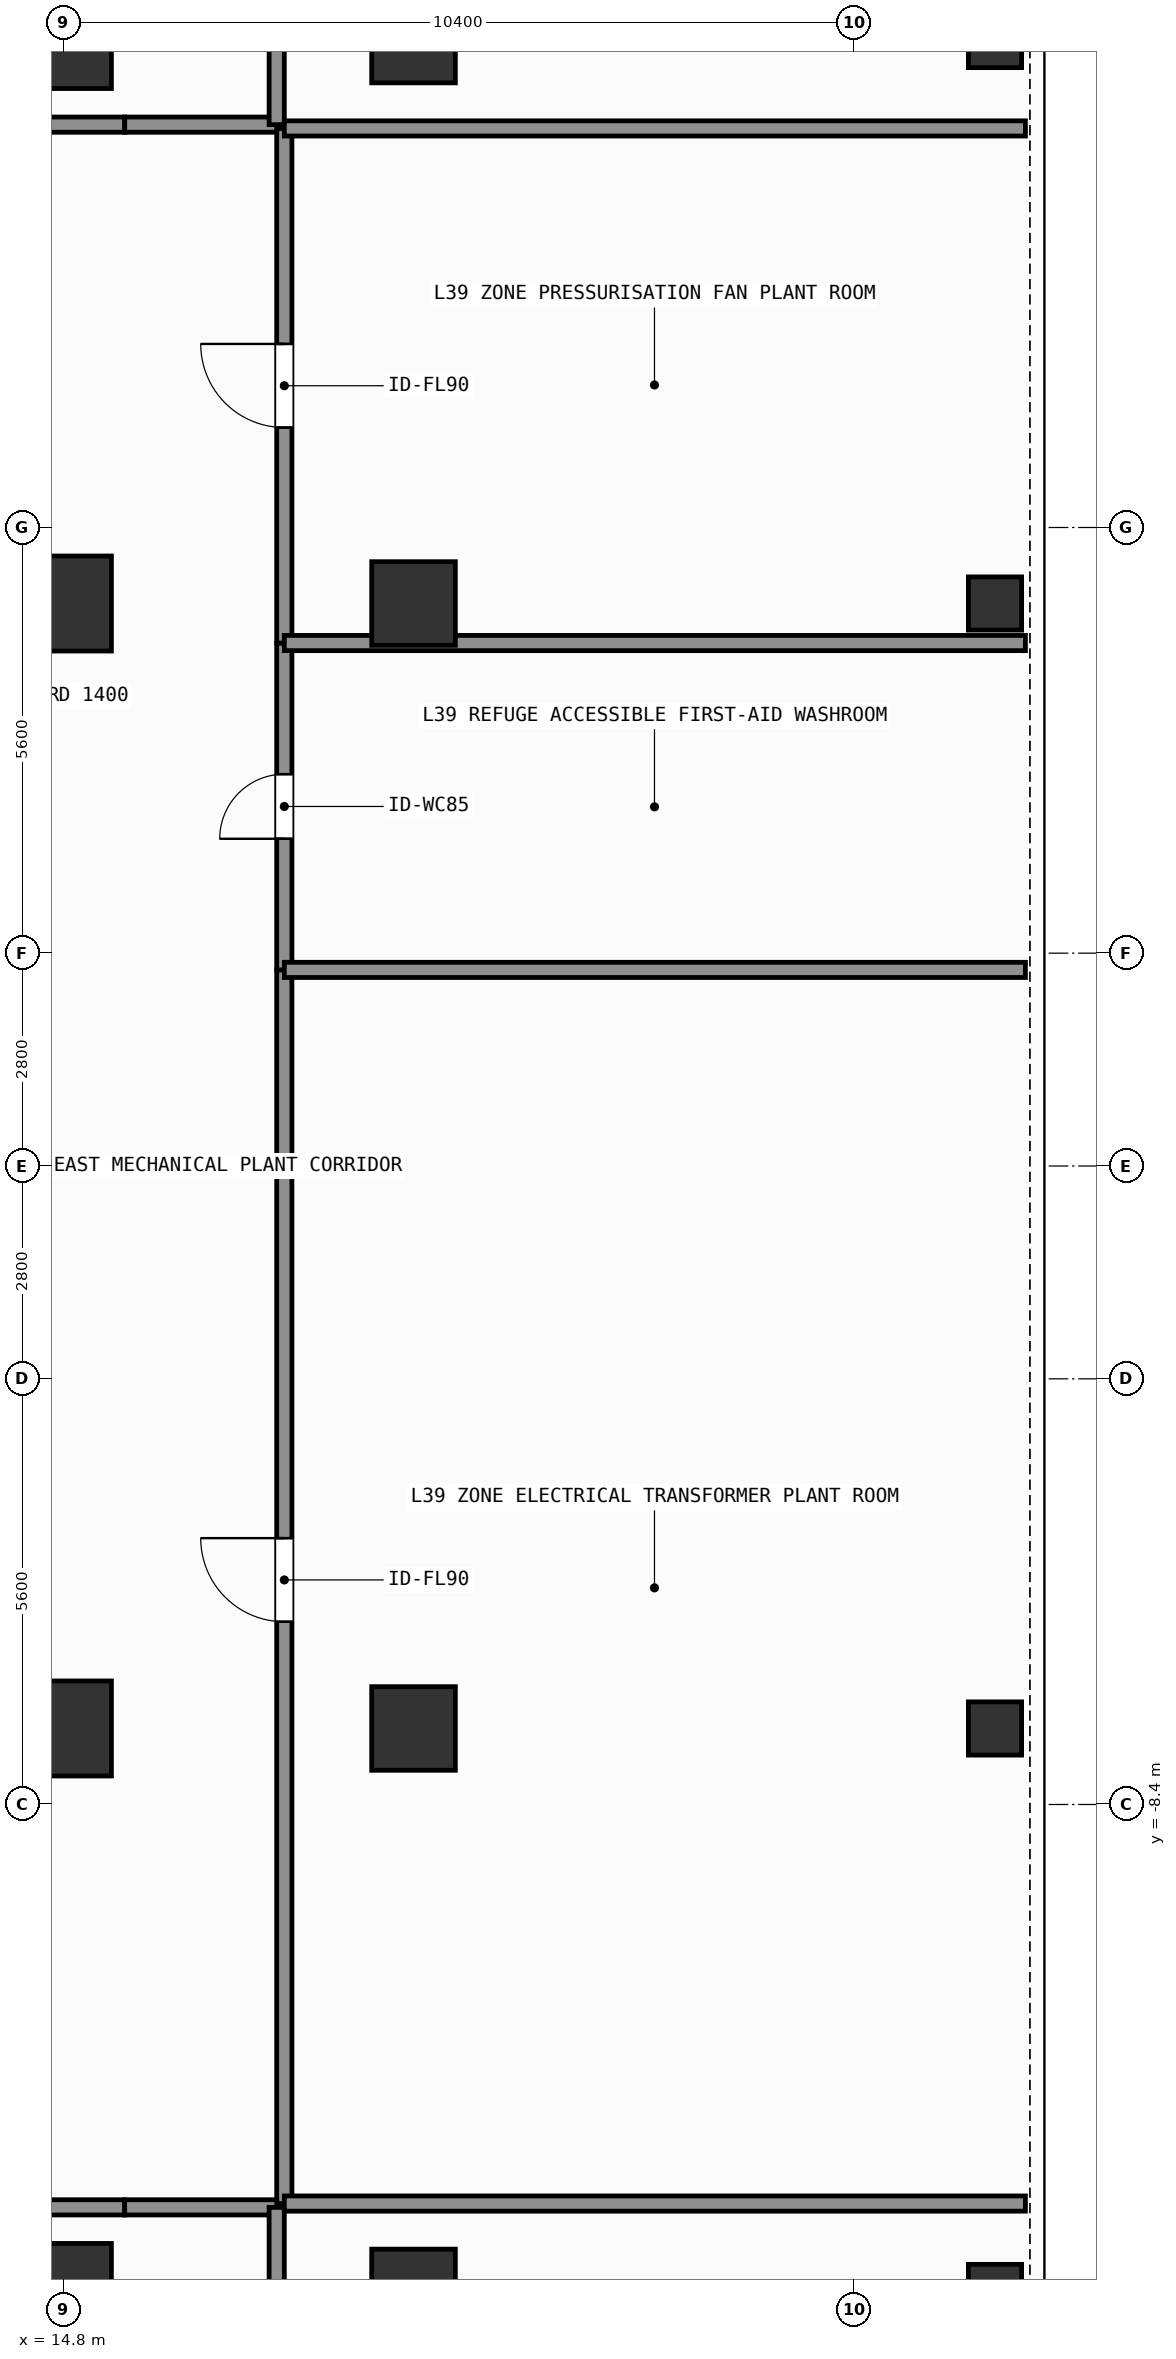
"""IFC4 building model, lengths in metres.
Left out: names, types, materials, properties, quantities, classifications, styles, units other than length and angle.
Written with IfcOpenShell. Run it as: python <this file> out.ifc"""

import sys

from ifc_helpers import new_model, si_unit, direction, frame, frame_2d, origin, origin_2d, place, context, subcontext, project, spatial, rectangle, hollow_rectangle, extrude, element, fill, save


model = new_model("IFC4")
c1 = context("Model", 3, precision=1e-05, world=origin(), true_north=direction((0.0, 1.0)))
c2 = subcontext(c1, "Body", "Model", "MODEL_VIEW")
j1 = project(units=[si_unit("LENGTHUNIT", "METRE"), si_unit("PLANEANGLEUNIT", "RADIAN")], contexts=[c1])
p1 = place(None, origin())
s1 = spatial("IfcSite", under=j1, at=p1, CompositionType="ELEMENT")
p2 = place(p1, origin())
s2 = spatial("IfcBuilding", under=s1, at=p2, CompositionType="ELEMENT")
p3 = place(p2, frame((0.0, 0.0, 156.3)))
s3 = spatial("IfcBuildingStorey", under=s2, at=p3, CompositionType="ELEMENT", Elevation=156.3)
for number, where, z_axis, x_axis in (
    (1, (14.8, -14.8, 0.0), (0.0, 0.0, 1.0), (1.0, 0.0, 0.0)),
    (2, (14.8, 14.8, 0.0), (0.0, 0.0, 1.0), (1.0, 0.0, 0.0)),
    (3, (14.8, -7.4, 0.0), (0.0, 0.0, 1.0), (1.0, 0.0, 0.0)),
    (4, (14.8, 7.4, 0.0), (0.0, 0.0, 1.0), (1.0, 0.0, 0.0)),
):
    element("IfcColumn", number, at=place(p3, frame(where, z_axis=z_axis, x_axis=x_axis)), inside=s3, PredefinedType="COLUMN", context=c2, shape_type="SweptSolid", body=[
        extrude(rectangle(XDim=1.25, YDim=1.25, at=origin_2d()), origin(), (0.0, 0.0, 1.0), 7.8),
    ])
for number, where, z_axis, x_axis in (
    (5, (19.4, -14.8, 0.0), (0.0, 0.0, 1.0), (1.0, 0.0, 0.0)),
    (6, (19.4, -7.4, 0.0), (0.0, 0.0, 1.0), (1.0, 0.0, 0.0)),
    (7, (19.4, 7.4, 0.0), (0.0, 0.0, 1.0), (1.0, 0.0, 0.0)),
    (8, (19.4, 14.8, 0.0), (0.0, 0.0, 1.0), (1.0, 0.0, 0.0)),
):
    element("IfcColumn", number, at=place(p3, frame(where, z_axis=z_axis, x_axis=x_axis)), inside=s3, PredefinedType="COLUMN", context=c2, shape_type="SweptSolid", body=[
        extrude(rectangle(XDim=1.1, YDim=1.1, at=origin_2d()), origin(), (0.0, 0.0, 1.0), 7.8),
    ])
for number, where, z_axis, x_axis in (
    (9, (27.05, -14.8, 0.0), (0.0, 0.0, 1.0), (1.0, 0.0, 0.0)),
    (10, (27.05, -7.4, 0.0), (0.0, 0.0, 1.0), (1.0, 0.0, 0.0)),
    (11, (27.05, 7.4, 0.0), (0.0, 0.0, 1.0), (1.0, 0.0, 0.0)),
    (12, (27.05, 14.8, 0.0), (0.0, 0.0, 1.0), (1.0, 0.0, 0.0)),
):
    element("IfcColumn", number, at=place(p3, frame(where, z_axis=z_axis, x_axis=x_axis)), inside=s3, PredefinedType="COLUMN", context=c2, shape_type="SweptSolid", body=[
        extrude(hollow_rectangle(XDim=0.7, YDim=0.7, WallThickness=0.032, at=origin_2d()), origin(), (0.0, 0.0, 1.0), 7.8),
    ])
p4 = place(p3, frame((-11.55, -13.7, 0.0), z_axis=(0.0, 0.0, 1.0), x_axis=(1.0, 0.0, 0.0)))
e13 = element("IfcWall", 13, at=p4, inside=s3, PredefinedType="SOLIDWALL", context=c2, shape_type="SweptSolid", body=[
    extrude(rectangle(XDim=27.15, YDim=0.2, at=frame_2d((13.575, 0.0))), origin(), (0.0, 0.0, 1.0), 7.58),
])
p5 = place(p4, frame((9.114, 0.0, 0.0)))
e14 = element("IfcOpeningElement", 14, at=p5, cuts=e13, PredefinedType="OPENING", context=c2, shape_type="SweptSolid", body=[
    extrude(rectangle(XDim=1.4, YDim=2.2, at=frame_2d((0.7, 1.1))), frame((0.0, 0.11, 0.0), z_axis=(0.0, -1.0, 0.0), x_axis=(1.0, 0.0, 0.0)), (0.0, 0.0, 1.0), 0.22),
])
p6 = place(p3, frame((-11.55, 13.7, 0.0), z_axis=(0.0, 0.0, 1.0), x_axis=(1.0, 0.0, 0.0)))
e15 = element("IfcWall", 15, at=p6, inside=s3, PredefinedType="SOLIDWALL", context=c2, shape_type="SweptSolid", body=[
    extrude(rectangle(XDim=27.15, YDim=0.2, at=frame_2d((13.575, 0.0))), origin(), (0.0, 0.0, 1.0), 7.58),
])
p7 = place(p6, frame((9.114, 0.0, 0.0)))
e16 = element("IfcOpeningElement", 16, at=p7, cuts=e15, PredefinedType="OPENING", context=c2, shape_type="SweptSolid", body=[
    extrude(rectangle(XDim=1.4, YDim=2.2, at=frame_2d((0.7, 1.1))), frame((0.0, 0.11, 0.0), z_axis=(0.0, -1.0, 0.0), x_axis=(1.0, 0.0, 0.0)), (0.0, 0.0, 1.0), 0.22),
])
p8 = place(p3, frame((17.7, -13.65, 0.0), z_axis=(0.0, 0.0, 1.0), x_axis=(0.0, 1.0, 0.0)))
e17 = element("IfcWall", 17, at=p8, inside=s3, PredefinedType="SOLIDWALL", context=c2, shape_type="SweptSolid", body=[
    extrude(rectangle(XDim=16.23, YDim=0.2, at=frame_2d((8.115, 0.0))), origin(), (0.0, 0.0, 1.0), 7.58),
])
p9 = place(p8, frame((7.654, 0.0, 0.0)))
e18 = element("IfcOpeningElement", 18, at=p9, cuts=e17, PredefinedType="OPENING", context=c2, shape_type="SweptSolid", body=[
    extrude(rectangle(XDim=1.1, YDim=2.15, at=frame_2d((0.55, 1.075))), frame((0.0, 0.11, 0.0), z_axis=(0.0, -1.0, 0.0), x_axis=(1.0, 0.0, 0.0)), (0.0, 0.0, 1.0), 0.22),
])
p10 = place(p3, frame((17.7, 2.58, 0.0), z_axis=(0.0, 0.0, 1.0), x_axis=(0.0, 1.0, 0.0)))
e19 = element("IfcWall", 19, at=p10, inside=s3, PredefinedType="SOLIDWALL", context=c2, shape_type="SweptSolid", body=[
    extrude(rectangle(XDim=4.3, YDim=0.2, at=frame_2d((2.15, 0.0))), origin(), (0.0, 0.0, 1.0), 7.58),
])
p11 = place(p10, frame((1.725, 0.0, 0.0)))
e20 = element("IfcOpeningElement", 20, at=p11, cuts=e19, PredefinedType="OPENING", context=c2, shape_type="SweptSolid", body=[
    extrude(rectangle(XDim=0.85, YDim=2.1, at=frame_2d((0.425, 1.05))), frame((0.0, 0.11, 0.0), z_axis=(0.0, -1.0, 0.0), x_axis=(1.0, 0.0, 0.0)), (0.0, 0.0, 1.0), 0.22),
])
p12 = place(p3, frame((17.7, 6.88, 0.0), z_axis=(0.0, 0.0, 1.0), x_axis=(0.0, 1.0, 0.0)))
e21 = element("IfcWall", 21, at=p12, inside=s3, PredefinedType="SOLIDWALL", context=c2, shape_type="SweptSolid", body=[
    extrude(rectangle(XDim=6.77, YDim=0.2, at=frame_2d((3.385, 0.0))), origin(), (0.0, 0.0, 1.0), 7.58),
])
p13 = place(p12, frame((2.835, 0.0, 0.0)))
e22 = element("IfcOpeningElement", 22, at=p13, cuts=e21, PredefinedType="OPENING", context=c2, shape_type="SweptSolid", body=[
    extrude(rectangle(XDim=1.1, YDim=2.15, at=frame_2d((0.55, 1.075))), frame((0.0, 0.11, 0.0), z_axis=(0.0, -1.0, 0.0), x_axis=(1.0, 0.0, 0.0)), (0.0, 0.0, 1.0), 0.22),
])
for number, where, z_axis, x_axis in (
    (23, (15.6, -13.7, 0.0), (0.0, 0.0, 1.0), (1.0, 0.0, 0.0)),
    (24, (15.6, 13.7, 0.0), (0.0, 0.0, 1.0), (1.0, 0.0, 0.0)),
):
    element("IfcWall", number, at=place(p3, frame(where, z_axis=z_axis, x_axis=x_axis)), inside=s3, PredefinedType="SOLIDWALL", context=c2, shape_type="SweptSolid", body=[
        extrude(rectangle(XDim=2.0, YDim=0.2, at=frame_2d((1.0, 0.0))), origin(), (0.0, 0.0, 1.0), 7.58),
    ])
for number, where, z_axis, x_axis in (
    (25, (17.6, -23.55, 0.0), (0.0, 0.0, 1.0), (0.0, 1.0, 0.0)),
    (26, (17.6, 13.7, 0.0), (0.0, 0.0, 1.0), (0.0, 1.0, 0.0)),
):
    element("IfcWall", number, at=place(p3, frame(where, z_axis=z_axis, x_axis=x_axis)), inside=s3, PredefinedType="SOLIDWALL", context=c2, shape_type="SweptSolid", body=[
        extrude(rectangle(XDim=9.85, YDim=0.2, at=frame_2d((4.925, 0.0))), origin(), (0.0, 0.0, 1.0), 7.58),
    ])
for number, where, z_axis, x_axis in (
    (27, (17.7, -13.65, 0.0), (0.0, 0.0, 1.0), (1.0, 0.0, 0.0)),
    (28, (17.7, 13.65, 0.0), (0.0, 0.0, 1.0), (1.0, 0.0, 0.0)),
    (29, (17.7, 2.58, 0.0), (0.0, 0.0, 1.0), (1.0, 0.0, 0.0)),
    (30, (17.7, 6.88, 0.0), (0.0, 0.0, 1.0), (1.0, 0.0, 0.0)),
):
    element("IfcWall", number, at=place(p3, frame(where, z_axis=z_axis, x_axis=x_axis)), inside=s3, PredefinedType="SOLIDWALL", context=c2, shape_type="SweptSolid", body=[
        extrude(rectangle(XDim=9.75, YDim=0.2, at=frame_2d((4.875, 0.0))), origin(), (0.0, 0.0, 1.0), 7.58),
    ])
p14 = place(p9, origin())
e31 = element("IfcDoor", 31, at=p14, inside=s3, OperationType="SINGLE_SWING_RIGHT", PredefinedType="DOOR", context=c2, shape_type="SweptSolid", body=[
    extrude(rectangle(XDim=1.1, YDim=2.15, at=frame_2d((0.55, 1.075))), frame((0.0, 0.025, 0.0), z_axis=(0.0, -1.0, 0.0), x_axis=(1.0, 0.0, 0.0)), (0.0, 0.0, 1.0), 0.05),
])
fill(e18, e31)
p15 = place(p11, origin())
e32 = element("IfcDoor", 32, at=p15, inside=s3, OperationType="SINGLE_SWING_LEFT", PredefinedType="DOOR", context=c2, shape_type="SweptSolid", body=[
    extrude(rectangle(XDim=0.85, YDim=2.1, at=frame_2d((0.425, 1.05))), frame((0.0, 0.025, 0.0), z_axis=(0.0, -1.0, 0.0), x_axis=(1.0, 0.0, 0.0)), (0.0, 0.0, 1.0), 0.05),
])
fill(e20, e32)
p16 = place(p13, origin())
e33 = element("IfcDoor", 33, at=p16, inside=s3, OperationType="SINGLE_SWING_RIGHT", PredefinedType="DOOR", context=c2, shape_type="SweptSolid", body=[
    extrude(rectangle(XDim=1.1, YDim=2.15, at=frame_2d((0.55, 1.075))), frame((0.0, 0.025, 0.0), z_axis=(0.0, -1.0, 0.0), x_axis=(1.0, 0.0, 0.0)), (0.0, 0.0, 1.0), 0.05),
])
fill(e22, e33)
save(model, sys.argv[1])
